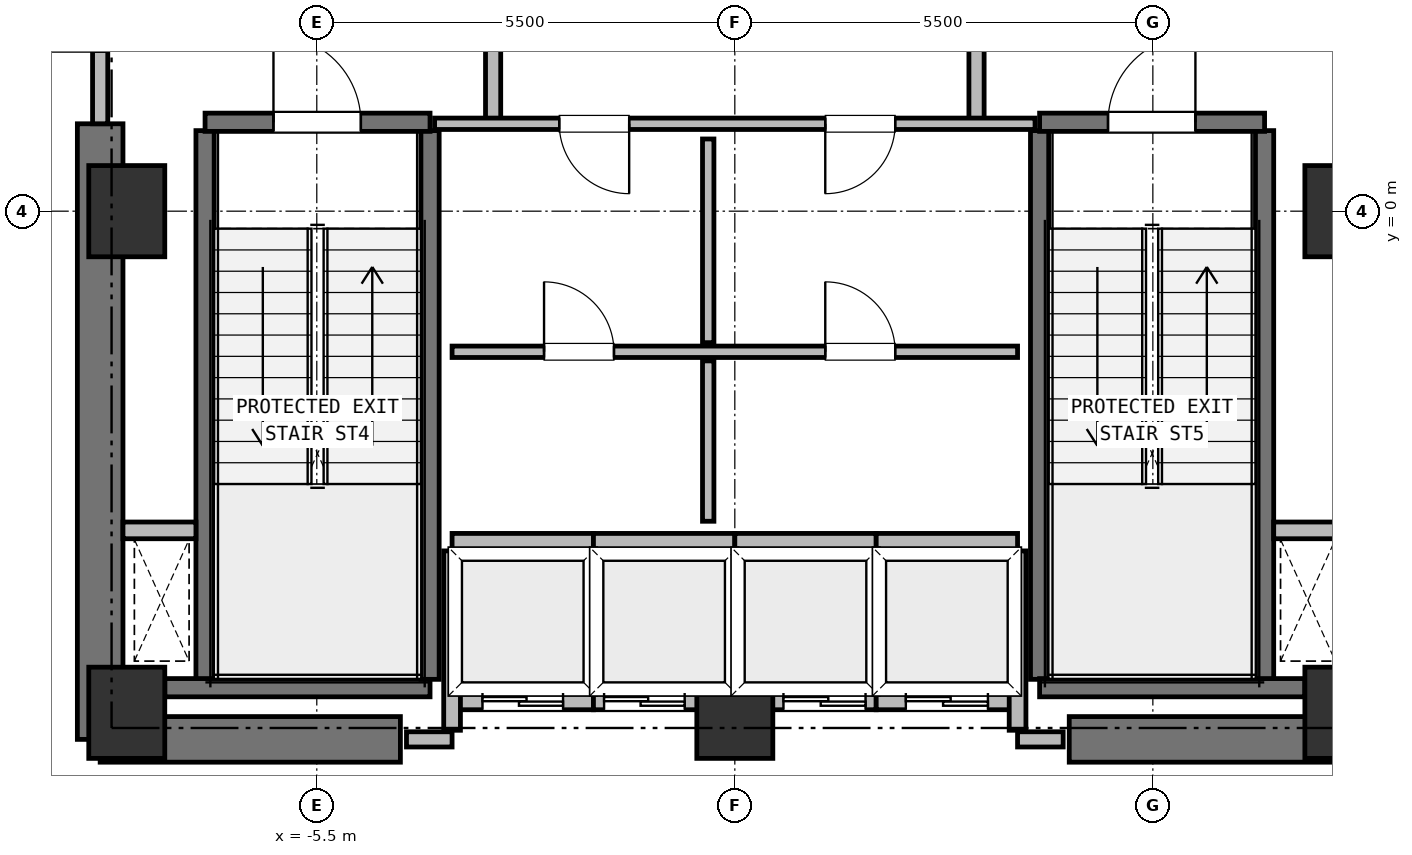
"""IFC4 building model, lengths in metres.
Left out: names, types, materials, properties, quantities, classifications, styles, units other than length and angle.
Written with IfcOpenShell. Run it as: python <this file> out.ifc"""

import sys

from ifc_helpers import new_model, si_unit, direction, frame, frame_2d, origin, origin_2d, place, context, subcontext, project, spatial, rectangle, extrude, element, fill, save


model = new_model("IFC4")
c1 = context("Model", 3, precision=1e-05, world=origin(), true_north=direction((0.0, 1.0)))
c2 = subcontext(c1, "Body", "Model", "MODEL_VIEW")
j1 = project(units=[si_unit("LENGTHUNIT", "METRE"), si_unit("PLANEANGLEUNIT", "RADIAN")], contexts=[c1])
p1 = place(None, origin())
s1 = spatial("IfcSite", under=j1, at=p1, CompositionType="ELEMENT")
p2 = place(p1, origin())
s2 = spatial("IfcBuilding", under=s1, at=p2, CompositionType="ELEMENT")
p3 = place(p2, frame((0.0, 0.0, 88.25)))
s3 = spatial("IfcBuildingStorey", under=s2, at=p3, CompositionType="ELEMENT", Elevation=88.25)
for number, where, z_axis, x_axis in (
    (1, (-8.0, -6.6, 0.0), (0.0, 0.0, 1.0), (1.0, 0.0, 0.0)),
    (2, (0.0, -6.6, 0.0), (0.0, 0.0, 1.0), (1.0, 0.0, 0.0)),
    (3, (8.0, -6.6, 0.0), (0.0, 0.0, 1.0), (1.0, 0.0, 0.0)),
    (4, (8.0, 0.0, 0.0), (0.0, 0.0, 1.0), (1.0, 0.0, 0.0)),
    (5, (-8.0, 0.0, 0.0), (0.0, 0.0, 1.0), (1.0, 0.0, 0.0)),
):
    element("IfcColumn", number, at=place(p3, frame(where, z_axis=z_axis, x_axis=x_axis)), inside=s3, PredefinedType="COLUMN", context=c2, shape_type="SweptSolid", body=[
        extrude(rectangle(XDim=1.0, YDim=1.2, at=origin_2d()), origin(), (0.0, 0.0, 1.0), 4.5),
    ])
for number, where, z_axis, x_axis in (
    (6, (-8.35, -6.95, 0.0), (0.0, 0.0, 1.0), (1.0, 0.0, 0.0)),
    (7, (4.4, -6.95, 0.0), (0.0, 0.0, 1.0), (1.0, 0.0, 0.0)),
):
    element("IfcWall", number, at=place(p3, frame(where, z_axis=z_axis, x_axis=x_axis)), inside=s3, PredefinedType="SHEAR", context=c2, shape_type="SweptSolid", body=[
        extrude(rectangle(XDim=3.95, YDim=0.6, at=frame_2d((1.975, 0.0))), origin(), (0.0, 0.0, 1.0), 4.21),
    ])
p4 = place(p3, frame((-8.35, -6.95, 0.0), z_axis=(0.0, 0.0, 1.0), x_axis=(0.0, 1.0, 0.0)))
e8 = element("IfcWall", 8, at=p4, inside=s3, PredefinedType="SHEAR", context=c2, shape_type="SweptSolid", body=[
    extrude(rectangle(XDim=8.1, YDim=0.6, at=frame_2d((4.05, 0.0))), origin(), (0.0, 0.0, 1.0), 4.21),
])
p5 = place(p3, frame((-6.97, -6.16, 0.0), z_axis=(0.0, 0.0, 1.0), x_axis=(0.0, 1.0, 0.0)))
e9 = element("IfcWall", 9, at=p5, inside=s3, PredefinedType="SHEAR", context=c2, shape_type="SweptSolid", body=[
    extrude(rectangle(XDim=7.22, YDim=0.24, at=frame_2d((3.61, 0.0))), origin(), (0.0, 0.0, 1.0), 4.21),
])
p6 = place(p3, frame((-7.5, -6.27, 0.0), z_axis=(0.0, 0.0, 1.0), x_axis=(1.0, 0.0, 0.0)))
e10 = element("IfcWall", 10, at=p6, inside=s3, PredefinedType="SHEAR", context=c2, shape_type="SweptSolid", body=[
    extrude(rectangle(XDim=3.49, YDim=0.24, at=frame_2d((1.745, 0.0))), origin(), (0.0, 0.0, 1.0), 4.21),
])
p7 = place(p3, frame((-4.01, -6.16, 0.0), z_axis=(0.0, 0.0, 1.0), x_axis=(0.0, 1.0, 0.0)))
e11 = element("IfcWall", 11, at=p7, inside=s3, PredefinedType="SHEAR", context=c2, shape_type="SweptSolid", body=[
    extrude(rectangle(XDim=7.22, YDim=0.24, at=frame_2d((3.61, 0.0))), origin(), (0.0, 0.0, 1.0), 4.21),
])
p8 = place(p3, frame((-6.97, 1.17, 0.0), z_axis=(0.0, 0.0, 1.0), x_axis=(1.0, 0.0, 0.0)))
e12 = element("IfcWall", 12, at=p8, inside=s3, PredefinedType="SHEAR", context=c2, shape_type="SweptSolid", body=[
    extrude(rectangle(XDim=2.96, YDim=0.24, at=frame_2d((1.48, 0.0))), origin(), (0.0, 0.0, 1.0), 4.21),
])
p9 = place(p8, frame((0.9, 0.0, 0.0)))
e13 = element("IfcOpeningElement", 13, at=p9, cuts=e12, PredefinedType="OPENING", context=c2, shape_type="SweptSolid", body=[
    extrude(rectangle(XDim=1.15, YDim=2.15, at=frame_2d((0.575, 1.075))), frame((0.0, 0.13, 0.0), z_axis=(0.0, -1.0, 0.0), x_axis=(1.0, 0.0, 0.0)), (0.0, 0.0, 1.0), 0.26),
])
for number, where, z_axis, x_axis in (
    (14, (4.01, -6.16, 0.0), (0.0, 0.0, 1.0), (0.0, 1.0, 0.0)),
    (15, (6.97, -6.16, 0.0), (0.0, 0.0, 1.0), (0.0, 1.0, 0.0)),
):
    element("IfcWall", number, at=place(p3, frame(where, z_axis=z_axis, x_axis=x_axis)), inside=s3, PredefinedType="SHEAR", context=c2, shape_type="SweptSolid", body=[
        extrude(rectangle(XDim=7.22, YDim=0.24, at=frame_2d((3.61, 0.0))), origin(), (0.0, 0.0, 1.0), 4.21),
    ])
p10 = place(p3, frame((4.01, -6.27, 0.0), z_axis=(0.0, 0.0, 1.0), x_axis=(1.0, 0.0, 0.0)))
e16 = element("IfcWall", 16, at=p10, inside=s3, PredefinedType="SHEAR", context=c2, shape_type="SweptSolid", body=[
    extrude(rectangle(XDim=3.49, YDim=0.24, at=frame_2d((1.745, 0.0))), origin(), (0.0, 0.0, 1.0), 4.21),
])
p11 = place(p3, frame((4.01, 1.17, 0.0), z_axis=(0.0, 0.0, 1.0), x_axis=(1.0, 0.0, 0.0)))
e17 = element("IfcWall", 17, at=p11, inside=s3, PredefinedType="SHEAR", context=c2, shape_type="SweptSolid", body=[
    extrude(rectangle(XDim=2.96, YDim=0.24, at=frame_2d((1.48, 0.0))), origin(), (0.0, 0.0, 1.0), 4.21),
])
p12 = place(p11, frame((0.9, 0.0, 0.0)))
e18 = element("IfcOpeningElement", 18, at=p12, cuts=e17, PredefinedType="OPENING", context=c2, shape_type="SweptSolid", body=[
    extrude(rectangle(XDim=1.15, YDim=2.15, at=frame_2d((0.575, 1.075))), frame((0.0, 0.13, 0.0), z_axis=(0.0, -1.0, 0.0), x_axis=(1.0, 0.0, 0.0)), (0.0, 0.0, 1.0), 0.26),
])
for number, where, z_axis, x_axis in (
    (19, (-8.05, -4.2, 0.0), (0.0, 0.0, 1.0), (1.0, 0.0, 0.0)),
    (20, (7.09, -4.2, 0.0), (0.0, 0.0, 1.0), (1.0, 0.0, 0.0)),
):
    element("IfcWall", number, at=place(p3, frame(where, z_axis=z_axis, x_axis=x_axis)), inside=s3, PredefinedType="PARTITIONING", context=c2, shape_type="SweptSolid", body=[
        extrude(rectangle(XDim=0.96, YDim=0.22, at=frame_2d((0.48, 0.0))), origin(), (0.0, 0.0, 1.0), 4.21),
    ])
p13 = place(p3, frame((-3.72, -6.45, 0.0), z_axis=(0.0, 0.0, 1.0), x_axis=(1.0, 0.0, 0.0)))
e21 = element("IfcWall", 21, at=p13, inside=s3, PredefinedType="PARTITIONING", context=c2, shape_type="SweptSolid", body=[
    extrude(rectangle(XDim=1.86, YDim=0.22, at=frame_2d((0.93, 0.0))), origin(), (0.0, 0.0, 1.0), 3.83),
])
p14 = place(p13, frame((0.4, 0.0, 0.0)))
e22 = element("IfcOpeningElement", 22, at=p14, cuts=e21, PredefinedType="OPENING", context=c2, shape_type="SweptSolid", body=[
    extrude(rectangle(XDim=1.06, YDim=2.15, at=frame_2d((0.53, 1.075))), frame((0.0, 0.12, 0.0), z_axis=(0.0, -1.0, 0.0), x_axis=(1.0, 0.0, 0.0)), (0.0, 0.0, 1.0), 0.24),
])
p15 = place(p3, frame((-3.72, -4.35, 0.0), z_axis=(0.0, 0.0, 1.0), x_axis=(1.0, 0.0, 0.0)))
e23 = element("IfcWall", 23, at=p15, inside=s3, PredefinedType="PARTITIONING", context=c2, shape_type="SweptSolid", body=[
    extrude(rectangle(XDim=1.86, YDim=0.22, at=frame_2d((0.93, 0.0))), origin(), (0.0, 0.0, 1.0), 4.21),
])
p16 = place(p3, frame((-3.72, -6.83, 0.0), z_axis=(0.0, 0.0, 1.0), x_axis=(0.0, 1.0, 0.0)))
e24 = element("IfcWall", 24, at=p16, inside=s3, PredefinedType="PARTITIONING", context=c2, shape_type="SweptSolid", body=[
    extrude(rectangle(XDim=2.36, YDim=0.22, at=frame_2d((1.18, 0.0))), origin(), (0.0, 0.0, 1.0), 4.21),
])
p17 = place(p3, frame((-1.86, -6.33, 0.0), z_axis=(0.0, 0.0, 1.0), x_axis=(0.0, 1.0, 0.0)))
e25 = element("IfcWall", 25, at=p17, inside=s3, PredefinedType="PARTITIONING", context=c2, shape_type="SweptSolid", body=[
    extrude(rectangle(XDim=1.86, YDim=0.22, at=frame_2d((0.93, 0.0))), origin(), (0.0, 0.0, 1.0), 4.21),
])
p18 = place(p3, frame((-1.86, -6.45, 0.0), z_axis=(0.0, 0.0, 1.0), x_axis=(1.0, 0.0, 0.0)))
e26 = element("IfcWall", 26, at=p18, inside=s3, PredefinedType="PARTITIONING", context=c2, shape_type="SweptSolid", body=[
    extrude(rectangle(XDim=1.86, YDim=0.22, at=frame_2d((0.93, 0.0))), origin(), (0.0, 0.0, 1.0), 3.83),
])
p19 = place(p18, frame((0.14, 0.0, 0.0)))
e27 = element("IfcOpeningElement", 27, at=p19, cuts=e26, PredefinedType="OPENING", context=c2, shape_type="SweptSolid", body=[
    extrude(rectangle(XDim=1.06, YDim=2.15, at=frame_2d((0.53, 1.075))), frame((0.0, 0.12, 0.0), z_axis=(0.0, -1.0, 0.0), x_axis=(1.0, 0.0, 0.0)), (0.0, 0.0, 1.0), 0.24),
])
for number, where, z_axis, x_axis in (
    (28, (-1.86, -4.35, 0.0), (0.0, 0.0, 1.0), (1.0, 0.0, 0.0)),
    (29, (0.0, -6.33, 0.0), (0.0, 0.0, 1.0), (0.0, 1.0, 0.0)),
):
    element("IfcWall", number, at=place(p3, frame(where, z_axis=z_axis, x_axis=x_axis)), inside=s3, PredefinedType="PARTITIONING", context=c2, shape_type="SweptSolid", body=[
        extrude(rectangle(XDim=1.86, YDim=0.22, at=frame_2d((0.93, 0.0))), origin(), (0.0, 0.0, 1.0), 4.21),
    ])
p20 = place(p3, frame((0.0, -6.45, 0.0), z_axis=(0.0, 0.0, 1.0), x_axis=(1.0, 0.0, 0.0)))
e30 = element("IfcWall", 30, at=p20, inside=s3, PredefinedType="PARTITIONING", context=c2, shape_type="SweptSolid", body=[
    extrude(rectangle(XDim=1.86, YDim=0.22, at=frame_2d((0.93, 0.0))), origin(), (0.0, 0.0, 1.0), 3.83),
])
p21 = place(p20, frame((0.64, 0.0, 0.0)))
e31 = element("IfcOpeningElement", 31, at=p21, cuts=e30, PredefinedType="OPENING", context=c2, shape_type="SweptSolid", body=[
    extrude(rectangle(XDim=1.08, YDim=2.15, at=frame_2d((0.54, 1.075))), frame((0.0, 0.12, 0.0), z_axis=(0.0, -1.0, 0.0), x_axis=(1.0, 0.0, 0.0)), (0.0, 0.0, 1.0), 0.24),
])
for number, where, z_axis, x_axis in (
    (32, (0.0, -4.35, 0.0), (0.0, 0.0, 1.0), (1.0, 0.0, 0.0)),
    (33, (1.86, -6.33, 0.0), (0.0, 0.0, 1.0), (0.0, 1.0, 0.0)),
):
    element("IfcWall", number, at=place(p3, frame(where, z_axis=z_axis, x_axis=x_axis)), inside=s3, PredefinedType="PARTITIONING", context=c2, shape_type="SweptSolid", body=[
        extrude(rectangle(XDim=1.86, YDim=0.22, at=frame_2d((0.93, 0.0))), origin(), (0.0, 0.0, 1.0), 4.21),
    ])
p22 = place(p3, frame((1.86, -6.45, 0.0), z_axis=(0.0, 0.0, 1.0), x_axis=(1.0, 0.0, 0.0)))
e34 = element("IfcWall", 34, at=p22, inside=s3, PredefinedType="PARTITIONING", context=c2, shape_type="SweptSolid", body=[
    extrude(rectangle(XDim=1.86, YDim=0.22, at=frame_2d((0.93, 0.0))), origin(), (0.0, 0.0, 1.0), 3.83),
])
p23 = place(p22, frame((0.39, 0.0, 0.0)))
e35 = element("IfcOpeningElement", 35, at=p23, cuts=e34, PredefinedType="OPENING", context=c2, shape_type="SweptSolid", body=[
    extrude(rectangle(XDim=1.08, YDim=2.15, at=frame_2d((0.54, 1.075))), frame((0.0, 0.12, 0.0), z_axis=(0.0, -1.0, 0.0), x_axis=(1.0, 0.0, 0.0)), (0.0, 0.0, 1.0), 0.24),
])
p24 = place(p3, frame((1.86, -4.35, 0.0), z_axis=(0.0, 0.0, 1.0), x_axis=(1.0, 0.0, 0.0)))
e36 = element("IfcWall", 36, at=p24, inside=s3, PredefinedType="PARTITIONING", context=c2, shape_type="SweptSolid", body=[
    extrude(rectangle(XDim=1.86, YDim=0.22, at=frame_2d((0.93, 0.0))), origin(), (0.0, 0.0, 1.0), 4.21),
])
p25 = place(p3, frame((3.72, -6.83, 0.0), z_axis=(0.0, 0.0, 1.0), x_axis=(0.0, 1.0, 0.0)))
e37 = element("IfcWall", 37, at=p25, inside=s3, PredefinedType="PARTITIONING", context=c2, shape_type="SweptSolid", body=[
    extrude(rectangle(XDim=2.36, YDim=0.22, at=frame_2d((1.18, 0.0))), origin(), (0.0, 0.0, 1.0), 4.21),
])
p26 = place(p3, frame((-3.18, 1.15, 0.0), z_axis=(0.0, 0.0, 1.0), x_axis=(0.0, 1.0, 0.0)))
e38 = element("IfcWall", 38, at=p26, inside=s3, PredefinedType="PARTITIONING", context=c2, shape_type="SweptSolid", body=[
    extrude(rectangle(XDim=3.3, YDim=0.2, at=frame_2d((1.65, 0.0))), origin(), (0.0, 0.0, 1.0), 4.21),
])
p27 = place(p26, frame((1.08, 0.0, 0.0)))
e39 = element("IfcOpeningElement", 39, at=p27, cuts=e38, PredefinedType="OPENING", context=c2, shape_type="SweptSolid", body=[
    extrude(rectangle(XDim=1.15, YDim=2.15, at=frame_2d((0.575, 1.075))), frame((0.0, 0.11, 0.0), z_axis=(0.0, -1.0, 0.0), x_axis=(1.0, 0.0, 0.0)), (0.0, 0.0, 1.0), 0.22),
])
p28 = place(p3, frame((3.18, 1.15, 0.0), z_axis=(0.0, 0.0, 1.0), x_axis=(0.0, 1.0, 0.0)))
e40 = element("IfcWall", 40, at=p28, inside=s3, PredefinedType="PARTITIONING", context=c2, shape_type="SweptSolid", body=[
    extrude(rectangle(XDim=3.3, YDim=0.2, at=frame_2d((1.65, 0.0))), origin(), (0.0, 0.0, 1.0), 4.21),
])
p29 = place(p28, frame((1.08, 0.0, 0.0)))
e41 = element("IfcOpeningElement", 41, at=p29, cuts=e40, PredefinedType="OPENING", context=c2, shape_type="SweptSolid", body=[
    extrude(rectangle(XDim=1.15, YDim=2.15, at=frame_2d((0.575, 1.075))), frame((0.0, 0.11, 0.0), z_axis=(0.0, -1.0, 0.0), x_axis=(1.0, 0.0, 0.0)), (0.0, 0.0, 1.0), 0.22),
])
p30 = place(p3, frame((-8.35, 1.15, 0.0), z_axis=(0.0, 0.0, 1.0), x_axis=(0.0, 1.0, 0.0)))
e42 = element("IfcWall", 42, at=p30, inside=s3, PredefinedType="PARTITIONING", context=c2, shape_type="SweptSolid", body=[
    extrude(rectangle(XDim=5.4, YDim=0.2, at=frame_2d((2.7, 0.0))), origin(), (0.0, 0.0, 1.0), 4.21),
])
p31 = place(p30, frame((0.95, 0.0, 0.0)))
e43 = element("IfcOpeningElement", 43, at=p31, cuts=e42, PredefinedType="OPENING", context=c2, shape_type="SweptSolid", body=[
    extrude(rectangle(XDim=1.15, YDim=2.15, at=frame_2d((0.575, 1.075))), frame((0.0, 0.11, 0.0), z_axis=(0.0, -1.0, 0.0), x_axis=(1.0, 0.0, 0.0)), (0.0, 0.0, 1.0), 0.22),
])
p32 = place(p3, frame((3.95, 1.15, 0.0), z_axis=(0.0, 0.0, 1.0), x_axis=(-1.0, 0.0, 0.0)))
e44 = element("IfcWall", 44, at=p32, inside=s3, PredefinedType="PARTITIONING", context=c2, shape_type="SweptSolid", body=[
    extrude(rectangle(XDim=7.9, YDim=0.15, at=frame_2d((3.95, 0.0))), origin(), (0.0, 0.0, 1.0), 4.21),
])
p33 = place(p32, frame((5.34, 0.0, 0.0)))
e45 = element("IfcOpeningElement", 45, at=p33, cuts=e44, PredefinedType="OPENING", context=c2, shape_type="SweptSolid", body=[
    extrude(rectangle(XDim=0.92, YDim=2.05, at=frame_2d((0.46, 1.025))), frame((0.0, 0.085, 0.0), z_axis=(0.0, -1.0, 0.0), x_axis=(1.0, 0.0, 0.0)), (0.0, 0.0, 1.0), 0.17),
])
p34 = place(p32, frame((1.84, 0.0, 0.0)))
e46 = element("IfcOpeningElement", 46, at=p34, cuts=e44, PredefinedType="OPENING", context=c2, shape_type="SweptSolid", body=[
    extrude(rectangle(XDim=0.92, YDim=2.05, at=frame_2d((0.46, 1.025))), frame((0.0, 0.085, 0.0), z_axis=(0.0, -1.0, 0.0), x_axis=(1.0, 0.0, 0.0)), (0.0, 0.0, 1.0), 0.17),
])
for number, where, z_axis, x_axis in (
    (47, (-4.32, -6.95, 0.0), (0.0, 0.0, 1.0), (1.0, 0.0, 0.0)),
    (48, (3.72, -6.95, 0.0), (0.0, 0.0, 1.0), (1.0, 0.0, 0.0)),
):
    element("IfcWall", number, at=place(p3, frame(where, z_axis=z_axis, x_axis=x_axis)), inside=s3, PredefinedType="PARTITIONING", context=c2, shape_type="SweptSolid", body=[
        extrude(rectangle(XDim=0.6, YDim=0.2, at=frame_2d((0.3, 0.0))), origin(), (0.0, 0.0, 1.0), 4.21),
    ])
p35 = place(p3, frame((-3.72, -1.85, 0.0), z_axis=(0.0, 0.0, 1.0), x_axis=(1.0, 0.0, 0.0)))
e49 = element("IfcWall", 49, at=p35, inside=s3, PredefinedType="PARTITIONING", context=c2, shape_type="SweptSolid", body=[
    extrude(rectangle(XDim=7.44, YDim=0.15, at=frame_2d((3.72, 0.0))), origin(), (0.0, 0.0, 1.0), 4.21),
])
p36 = place(p35, frame((1.21, 0.0, 0.0)))
e50 = element("IfcOpeningElement", 50, at=p36, cuts=e49, PredefinedType="OPENING", context=c2, shape_type="SweptSolid", body=[
    extrude(rectangle(XDim=0.92, YDim=2.05, at=frame_2d((0.46, 1.025))), frame((0.0, 0.085, 0.0), z_axis=(0.0, -1.0, 0.0), x_axis=(1.0, 0.0, 0.0)), (0.0, 0.0, 1.0), 0.17),
])
p37 = place(p35, frame((4.91, 0.0, 0.0)))
e51 = element("IfcOpeningElement", 51, at=p37, cuts=e49, PredefinedType="OPENING", context=c2, shape_type="SweptSolid", body=[
    extrude(rectangle(XDim=0.92, YDim=2.05, at=frame_2d((0.46, 1.025))), frame((0.0, 0.085, 0.0), z_axis=(0.0, -1.0, 0.0), x_axis=(1.0, 0.0, 0.0)), (0.0, 0.0, 1.0), 0.17),
])
p38 = place(p3, frame((-0.35, -4.08, 0.0), z_axis=(0.0, 0.0, 1.0), x_axis=(0.0, 1.0, 0.0)))
e52 = element("IfcWall", 52, at=p38, inside=s3, PredefinedType="PARTITIONING", context=c2, shape_type="SweptSolid", body=[
    extrude(rectangle(XDim=2.11, YDim=0.15, at=frame_2d((1.055, 0.0))), origin(), (0.0, 0.0, 1.0), 4.21),
])
p39 = place(p3, frame((-0.35, -1.73, 0.0), z_axis=(0.0, 0.0, 1.0), x_axis=(0.0, 1.0, 0.0)))
e53 = element("IfcWall", 53, at=p39, inside=s3, PredefinedType="PARTITIONING", context=c2, shape_type="SweptSolid", body=[
    extrude(rectangle(XDim=2.68, YDim=0.15, at=frame_2d((1.34, 0.0))), origin(), (0.0, 0.0, 1.0), 4.21),
])
p40 = place(p3, frame((-8.578, -9.352, 0.0), z_axis=(0.0, 0.0, 1.0), x_axis=(-0.707067066127, 0.707146494016, 0.0)))
e54 = element("IfcWall", 54, at=p40, inside=s3, PredefinedType="PARTITIONING", context=c2, shape_type="SweptSolid", body=[
    extrude(rectangle(XDim=3.074, YDim=0.15, at=frame_2d((1.537, 0.0))), origin(), (0.0, 0.0, 1.0), 4.21),
])
p41 = place(p9, origin())
e55 = element("IfcDoor", 55, at=p41, inside=s3, OperationType="SINGLE_SWING_LEFT", PredefinedType="DOOR", context=c2, shape_type="SweptSolid", body=[
    extrude(rectangle(XDim=1.15, YDim=2.15, at=frame_2d((0.575, 1.075))), frame((0.0, 0.025, 0.0), z_axis=(0.0, -1.0, 0.0), x_axis=(1.0, 0.0, 0.0)), (0.0, 0.0, 1.0), 0.05),
])
fill(e13, e55)
p42 = place(p12, origin())
e56 = element("IfcDoor", 56, at=p42, inside=s3, OperationType="SINGLE_SWING_RIGHT", PredefinedType="DOOR", context=c2, shape_type="SweptSolid", body=[
    extrude(rectangle(XDim=1.15, YDim=2.15, at=frame_2d((0.575, 1.075))), frame((0.0, 0.025, 0.0), z_axis=(0.0, -1.0, 0.0), x_axis=(1.0, 0.0, 0.0)), (0.0, 0.0, 1.0), 0.05),
])
fill(e18, e56)
p43 = place(p14, origin())
e57 = element("IfcDoor", 57, at=p43, inside=s3, OperationType="DOUBLE_DOOR_SLIDING", PredefinedType="DOOR", context=c2, shape_type="SweptSolid", body=[
    extrude(rectangle(XDim=1.06, YDim=2.15, at=frame_2d((0.53, 1.075))), frame((0.0, 0.025, 0.0), z_axis=(0.0, -1.0, 0.0), x_axis=(1.0, 0.0, 0.0)), (0.0, 0.0, 1.0), 0.05),
])
fill(e22, e57)
p44 = place(p19, origin())
e58 = element("IfcDoor", 58, at=p44, inside=s3, OperationType="DOUBLE_DOOR_SLIDING", PredefinedType="DOOR", context=c2, shape_type="SweptSolid", body=[
    extrude(rectangle(XDim=1.06, YDim=2.15, at=frame_2d((0.53, 1.075))), frame((0.0, 0.025, 0.0), z_axis=(0.0, -1.0, 0.0), x_axis=(1.0, 0.0, 0.0)), (0.0, 0.0, 1.0), 0.05),
])
fill(e27, e58)
p45 = place(p21, origin())
e59 = element("IfcDoor", 59, at=p45, inside=s3, OperationType="DOUBLE_DOOR_SLIDING", PredefinedType="DOOR", context=c2, shape_type="SweptSolid", body=[
    extrude(rectangle(XDim=1.08, YDim=2.15, at=frame_2d((0.54, 1.075))), frame((0.0, 0.025, 0.0), z_axis=(0.0, -1.0, 0.0), x_axis=(1.0, 0.0, 0.0)), (0.0, 0.0, 1.0), 0.05),
])
fill(e31, e59)
p46 = place(p23, origin())
e60 = element("IfcDoor", 60, at=p46, inside=s3, OperationType="DOUBLE_DOOR_SLIDING", PredefinedType="DOOR", context=c2, shape_type="SweptSolid", body=[
    extrude(rectangle(XDim=1.08, YDim=2.15, at=frame_2d((0.54, 1.075))), frame((0.0, 0.025, 0.0), z_axis=(0.0, -1.0, 0.0), x_axis=(1.0, 0.0, 0.0)), (0.0, 0.0, 1.0), 0.05),
])
fill(e35, e60)
p47 = place(p31, origin())
e61 = element("IfcDoor", 61, at=p47, inside=s3, OperationType="SINGLE_SWING_LEFT", PredefinedType="DOOR", context=c2, shape_type="SweptSolid", body=[
    extrude(rectangle(XDim=1.15, YDim=2.15, at=frame_2d((0.575, 1.075))), frame((0.0, 0.025, 0.0), z_axis=(0.0, -1.0, 0.0), x_axis=(1.0, 0.0, 0.0)), (0.0, 0.0, 1.0), 0.05),
])
fill(e43, e61)
p48 = place(p33, origin())
e62 = element("IfcDoor", 62, at=p48, inside=s3, OperationType="SINGLE_SWING_LEFT", PredefinedType="DOOR", context=c2, shape_type="SweptSolid", body=[
    extrude(rectangle(XDim=0.92, YDim=2.05, at=frame_2d((0.46, 1.025))), frame((0.0, 0.025, 0.0), z_axis=(0.0, -1.0, 0.0), x_axis=(1.0, 0.0, 0.0)), (0.0, 0.0, 1.0), 0.05),
])
fill(e45, e62)
p49 = place(p34, origin())
e63 = element("IfcDoor", 63, at=p49, inside=s3, OperationType="SINGLE_SWING_RIGHT", PredefinedType="DOOR", context=c2, shape_type="SweptSolid", body=[
    extrude(rectangle(XDim=0.92, YDim=2.05, at=frame_2d((0.46, 1.025))), frame((0.0, 0.025, 0.0), z_axis=(0.0, -1.0, 0.0), x_axis=(1.0, 0.0, 0.0)), (0.0, 0.0, 1.0), 0.05),
])
fill(e46, e63)
p50 = place(p36, origin())
e64 = element("IfcDoor", 64, at=p50, inside=s3, OperationType="SINGLE_SWING_LEFT", PredefinedType="DOOR", context=c2, shape_type="SweptSolid", body=[
    extrude(rectangle(XDim=0.92, YDim=2.05, at=frame_2d((0.46, 1.025))), frame((0.0, 0.025, 0.0), z_axis=(0.0, -1.0, 0.0), x_axis=(1.0, 0.0, 0.0)), (0.0, 0.0, 1.0), 0.05),
])
fill(e50, e64)
p51 = place(p37, origin())
e65 = element("IfcDoor", 65, at=p51, inside=s3, OperationType="SINGLE_SWING_LEFT", PredefinedType="DOOR", context=c2, shape_type="SweptSolid", body=[
    extrude(rectangle(XDim=0.92, YDim=2.05, at=frame_2d((0.46, 1.025))), frame((0.0, 0.025, 0.0), z_axis=(0.0, -1.0, 0.0), x_axis=(1.0, 0.0, 0.0)), (0.0, 0.0, 1.0), 0.05),
])
fill(e51, e65)
save(model, sys.argv[1])
